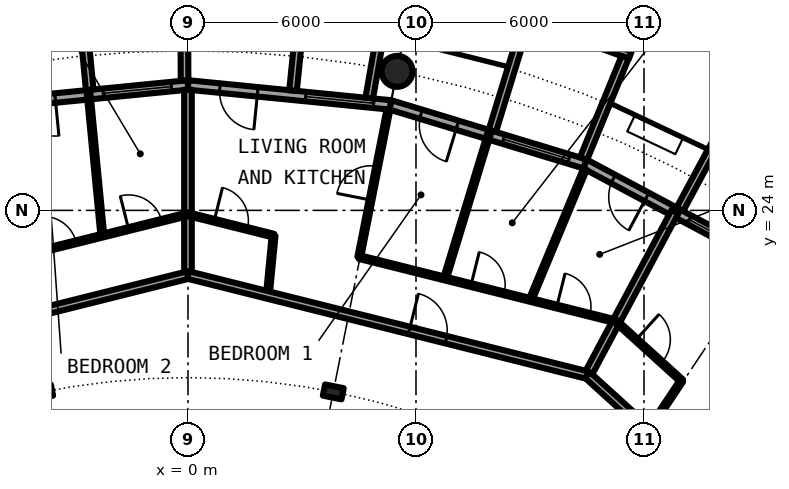
"""IFC4 building model, lengths in metres.
Left out: names, types, materials, properties, quantities, classifications, styles, units other than length and angle.
Written with IfcOpenShell. Run it as: python <this file> out.ifc"""

import sys

from ifc_helpers import new_model, si_unit, direction, frame, frame_2d, origin, origin_2d, place, context, subcontext, project, spatial, rectangle, circle, hollow_circle, i_section, extrude, element, fill, save


model = new_model("IFC4")
c1 = context("Model", 3, precision=1e-05, world=origin(), true_north=direction((0.0, 1.0)))
c2 = subcontext(c1, "Body", "Model", "MODEL_VIEW")
j1 = project(units=[si_unit("LENGTHUNIT", "METRE"), si_unit("PLANEANGLEUNIT", "RADIAN")], contexts=[c1])
p1 = place(None, origin())
s1 = spatial("IfcSite", under=j1, at=p1, CompositionType="ELEMENT")
p2 = place(p1, origin())
s2 = spatial("IfcBuilding", under=s1, at=p2, CompositionType="ELEMENT")
p3 = place(p2, frame((0.0, 0.0, 161.6)))
s3 = spatial("IfcBuildingStorey", under=s2, at=p3, CompositionType="ELEMENT", Elevation=161.6)
p4 = place(p3, frame((5.501, 27.658, 0.0), z_axis=(0.0, 0.0, 1.0), x_axis=(1.0, 0.0, 0.0)))
e1 = element("IfcColumn", 1, at=p4, inside=s3, PredefinedType="COLUMN", context=c2, shape_type="SweptSolid", body=[
    extrude(hollow_circle(Radius=0.406, WallThickness=0.04, at=origin_2d()), origin(), (0.0, 0.0, 1.0), 3.05),
])
for number, where, z_axis, x_axis in (
    (2, (3.824, 19.223, 0.0), (0.0, 0.0, 1.0), (0.195, 0.981, 0.0)),
    (3, (-3.824, 19.223, 0.0), (0.0, 0.0, 1.0), (-0.195, 0.981, 0.0)),
):
    element("IfcColumn", number, at=place(p3, frame(where, z_axis=z_axis, x_axis=x_axis)), inside=s3, PredefinedType="COLUMN", context=c2, shape_type="SweptSolid", body=[
        extrude(i_section(OverallWidth=0.3, OverallDepth=0.5, WebThickness=0.014, FlangeThickness=0.028, FilletRadius=0.027, at=origin_2d()), origin(), (0.0, 0.0, 1.0), 3.05),
    ])
p5 = place(p3, frame((15.167, 22.699, 0.0), z_axis=(0.0, 0.0, 1.0), x_axis=(-0.881915646801, 0.471407246368, 0.0)))
e4 = element("IfcWall", 4, at=p5, inside=s3, PredefinedType="SOLIDWALL", context=c2, shape_type="SweptSolid", body=[
    extrude(rectangle(XDim=5.352, YDim=0.25, at=frame_2d((2.676, 0.0))), origin(), (0.0, 0.0, 1.0), 2.7),
])
p6 = place(p5, frame((0.441, 0.0, 0.3)))
e5 = element("IfcOpeningElement", 5, at=p6, cuts=e4, PredefinedType="OPENING", context=c2, shape_type="SweptSolid", body=[
    extrude(rectangle(XDim=1.8, YDim=2.1, at=frame_2d((0.9, 1.05))), frame((0.0, 0.135, 0.0), z_axis=(0.0, -1.0, 0.0), x_axis=(1.0, 0.0, 0.0)), (0.0, 0.0, 1.0), 0.27),
])
p7 = place(p5, frame((3.51, 0.0, 0.0)))
e6 = element("IfcOpeningElement", 6, at=p7, cuts=e4, PredefinedType="OPENING", context=c2, shape_type="SweptSolid", body=[
    extrude(rectangle(XDim=1.0, YDim=2.2, at=frame_2d((0.5, 1.1))), frame((0.0, 0.135, 0.0), z_axis=(0.0, -1.0, 0.0), x_axis=(1.0, 0.0, 0.0)), (0.0, 0.0, 1.0), 0.27),
])
p8 = place(p3, frame((12.945, 24.029, -0.03), z_axis=(0.0, 0.0, 1.0), x_axis=(0.474424310775, 0.88029629861, 0.0)))
e7 = element("IfcWall", 7, at=p8, inside=s3, PredefinedType="SOLIDWALL", context=c2, shape_type="SweptSolid", body=[
    extrude(rectangle(XDim=3.006, YDim=0.2, at=frame_2d((1.503, 0.0))), origin(), (0.0, 0.0, 1.0), 2.73),
])
p9 = place(p3, frame((10.447, 25.222, 0.0), z_axis=(0.0, 0.0, 1.0), x_axis=(-0.956965678721, 0.290201119486, 0.0)))
e8 = element("IfcWall", 8, at=p9, inside=s3, PredefinedType="SOLIDWALL", context=c2, shape_type="SweptSolid", body=[
    extrude(rectangle(XDim=5.351, YDim=0.25, at=frame_2d((2.676, 0.0))), origin(), (0.0, 0.0, 1.0), 2.7),
])
p10 = place(p9, frame((0.441, 0.0, 0.3)))
e9 = element("IfcOpeningElement", 9, at=p10, cuts=e8, PredefinedType="OPENING", context=c2, shape_type="SweptSolid", body=[
    extrude(rectangle(XDim=1.8, YDim=2.1, at=frame_2d((0.9, 1.05))), frame((0.0, 0.135, 0.0), z_axis=(0.0, -1.0, 0.0), x_axis=(1.0, 0.0, 0.0)), (0.0, 0.0, 1.0), 0.27),
])
p11 = place(p9, frame((3.51, 0.0, 0.0)))
e10 = element("IfcOpeningElement", 10, at=p11, cuts=e8, PredefinedType="OPENING", context=c2, shape_type="SweptSolid", body=[
    extrude(rectangle(XDim=1.0, YDim=2.2, at=frame_2d((0.5, 1.1))), frame((0.0, 0.135, 0.0), z_axis=(0.0, -1.0, 0.0), x_axis=(1.0, 0.0, 0.0)), (0.0, 0.0, 1.0), 0.27),
])
p12 = place(p3, frame((11.638, 28.084, -0.03), z_axis=(0.0, 0.0, 1.0), x_axis=(-0.941461077774, 0.337121697664, 0.0)))
e11 = element("IfcWall", 11, at=p12, inside=s3, PredefinedType="SOLIDWALL", context=c2, shape_type="SweptSolid", body=[
    extrude(rectangle(XDim=2.993, YDim=0.2, at=frame_2d((1.497, 0.0))), origin(), (0.0, 0.0, 1.0), 2.73),
])
p13 = place(p12, frame((0.457, 0.0, 0.33)))
e12 = element("IfcOpeningElement", 12, at=p13, cuts=e11, PredefinedType="OPENING", context=c2, shape_type="SweptSolid", body=[
    extrude(circle(Radius=1.04, at=frame_2d((1.04, 1.04))), frame((0.0, 0.11, 0.0), z_axis=(0.0, -1.0, 0.0), x_axis=(1.0, 0.0, 0.0)), (0.0, 0.0, 1.0), 0.22),
])
p14 = place(p3, frame((10.409, 25.364, -0.03), z_axis=(0.0, 0.0, 1.0), x_axis=(0.379509886562, 0.925187681501, 0.0)))
e13 = element("IfcWall", 13, at=p14, inside=s3, PredefinedType="SOLIDWALL", context=c2, shape_type="SweptSolid", body=[
    extrude(rectangle(XDim=2.883, YDim=0.2, at=frame_2d((1.441, 0.0))), origin(), (0.0, 0.0, 1.0), 2.73),
])
p15 = place(p3, frame((8.009, 26.092, -0.03), z_axis=(0.0, 0.0, 1.0), x_axis=(0.293406695073, 0.955987715029, 0.0)))
e14 = element("IfcWall", 14, at=p15, inside=s3, PredefinedType="SOLIDWALL", context=c2, shape_type="SweptSolid", body=[
    extrude(rectangle(XDim=3.006, YDim=0.2, at=frame_2d((1.503, 0.0))), origin(), (0.0, 0.0, 1.0), 2.73),
])
p16 = place(p3, frame((5.326, 26.775, 0.0), z_axis=(0.0, 0.0, 1.0), x_axis=(-0.995173996315, 0.098126026407, 0.0)))
e15 = element("IfcWall", 15, at=p16, inside=s3, PredefinedType="SOLIDWALL", context=c2, shape_type="SweptSolid", body=[
    extrude(rectangle(XDim=5.352, YDim=0.25, at=frame_2d((2.676, 0.0))), origin(), (0.0, 0.0, 1.0), 2.7),
])
p17 = place(p16, frame((0.441, 0.0, 0.3)))
e16 = element("IfcOpeningElement", 16, at=p17, cuts=e15, PredefinedType="OPENING", context=c2, shape_type="SweptSolid", body=[
    extrude(rectangle(XDim=1.8, YDim=2.1, at=frame_2d((0.9, 1.05))), frame((0.0, 0.135, 0.0), z_axis=(0.0, -1.0, 0.0), x_axis=(1.0, 0.0, 0.0)), (0.0, 0.0, 1.0), 0.27),
])
p18 = place(p16, frame((3.51, 0.0, 0.0)))
e17 = element("IfcOpeningElement", 17, at=p18, cuts=e15, PredefinedType="OPENING", context=c2, shape_type="SweptSolid", body=[
    extrude(rectangle(XDim=1.0, YDim=2.2, at=frame_2d((0.5, 1.1))), frame((0.0, 0.135, 0.0), z_axis=(0.0, -1.0, 0.0), x_axis=(1.0, 0.0, 0.0)), (0.0, 0.0, 1.0), 0.27),
])
p19 = place(p3, frame((4.769, 26.956, -0.03), z_axis=(0.0, 0.0, 1.0), x_axis=(0.174056778901, 0.984735618183, 0.0)))
e18 = element("IfcWall", 18, at=p19, inside=s3, PredefinedType="SOLIDWALL", context=c2, shape_type="SweptSolid", body=[
    extrude(rectangle(XDim=2.925, YDim=0.2, at=frame_2d((1.462, 0.0))), origin(), (0.0, 0.0, 1.0), 2.73),
])
p20 = place(p3, frame((2.764, 27.153, -0.03), z_axis=(0.0, 0.0, 1.0), x_axis=(0.101505487237, 0.994834979311, 0.0)))
e19 = element("IfcWall", 19, at=p20, inside=s3, PredefinedType="SOLIDWALL", context=c2, shape_type="SweptSolid", body=[
    extrude(rectangle(XDim=3.007, YDim=0.2, at=frame_2d((1.503, 0.0))), origin(), (0.0, 0.0, 1.0), 2.73),
])
p21 = place(p3, frame((0.0, 27.3, 0.0), z_axis=(0.0, 0.0, 1.0), x_axis=(-0.995173996315, -0.098126026407, 0.0)))
e20 = element("IfcWall", 20, at=p21, inside=s3, PredefinedType="SOLIDWALL", context=c2, shape_type="SweptSolid", body=[
    extrude(rectangle(XDim=5.352, YDim=0.25, at=frame_2d((2.676, 0.0))), origin(), (0.0, 0.0, 1.0), 2.7),
])
p22 = place(p21, frame((0.441, 0.0, 0.3)))
e21 = element("IfcOpeningElement", 21, at=p22, cuts=e20, PredefinedType="OPENING", context=c2, shape_type="SweptSolid", body=[
    extrude(rectangle(XDim=1.8, YDim=2.1, at=frame_2d((0.9, 1.05))), frame((0.0, 0.135, 0.0), z_axis=(0.0, -1.0, 0.0), x_axis=(1.0, 0.0, 0.0)), (0.0, 0.0, 1.0), 0.27),
])
p23 = place(p21, frame((3.51, 0.0, 0.0)))
e22 = element("IfcOpeningElement", 22, at=p23, cuts=e20, PredefinedType="OPENING", context=c2, shape_type="SweptSolid", body=[
    extrude(rectangle(XDim=1.0, YDim=2.2, at=frame_2d((0.5, 1.1))), frame((0.0, 0.135, 0.0), z_axis=(0.0, -1.0, 0.0), x_axis=(1.0, 0.0, 0.0)), (0.0, 0.0, 1.0), 0.27),
])
p24 = place(p3, frame((-0.09, 27.417, -0.03), z_axis=(0.0, 0.0, 1.0), x_axis=(-0.00347308367, 0.999993968827, 0.0)))
e23 = element("IfcWall", 23, at=p24, inside=s3, PredefinedType="SOLIDWALL", context=c2, shape_type="SweptSolid", body=[
    extrude(rectangle(XDim=2.882, YDim=0.2, at=frame_2d((1.441, 0.0))), origin(), (0.0, 0.0, 1.0), 2.73),
])
p25 = place(p3, frame((-2.586, 27.171, -0.03), z_axis=(0.0, 0.0, 1.0), x_axis=(-0.094548432284, 0.995520262954, 0.0)))
e24 = element("IfcWall", 24, at=p25, inside=s3, PredefinedType="SOLIDWALL", context=c2, shape_type="SweptSolid", body=[
    extrude(rectangle(XDim=3.006, YDim=0.2, at=frame_2d((1.503, 0.0))), origin(), (0.0, 0.0, 1.0), 2.73),
])
p26 = place(p3, frame((-2.612, 27.049, 0.0), z_axis=(0.0, 0.0, 1.0), x_axis=(0.09626981452, -0.995355274669, 0.0)))
e25 = element("IfcWall", 25, at=p26, inside=s3, PredefinedType="PARTITIONING", context=c2, shape_type="SweptSolid", body=[
    extrude(rectangle(XDim=3.73, YDim=0.1, at=frame_2d((1.865, 0.0))), origin(), (0.0, 0.0, 1.0), 2.7),
])
p27 = place(p3, frame((0.0, 22.3, 0.0), z_axis=(0.0, 0.0, 1.0), x_axis=(0.0, 1.0, 0.0)))
e26 = element("IfcWall", 26, at=p27, inside=s3, PredefinedType="PARTITIONING", context=c2, shape_type="SweptSolid", body=[
    extrude(rectangle(XDim=4.875, YDim=0.2, at=frame_2d((2.438, 0.0))), origin(), (0.0, 0.0, 1.0), 2.7),
])
p28 = place(p3, frame((2.102, 21.773, 0.0), z_axis=(0.0, 0.0, 1.0), x_axis=(0.09608568494, 0.995373066317, 0.0)))
e27 = element("IfcWall", 27, at=p28, inside=s3, PredefinedType="PARTITIONING", context=c2, shape_type="SweptSolid", body=[
    extrude(rectangle(XDim=1.57, YDim=0.1, at=frame_2d((0.785, 0.0))), origin(), (0.0, 0.0, 1.0), 2.7),
])
p29 = place(p3, frame((4.507, 22.771, 0.0), z_axis=(0.0, 0.0, 1.0), x_axis=(0.194030211642, 0.980995554001, 0.0)))
e28 = element("IfcWall", 28, at=p29, inside=s3, PredefinedType="PARTITIONING", context=c2, shape_type="SweptSolid", body=[
    extrude(rectangle(XDim=3.962, YDim=0.1, at=frame_2d((1.981, 0.0))), origin(), (0.0, 0.0, 1.0), 2.7),
])
p30 = place(p29, frame((1.531, 0.0, 0.0)))
e29 = element("IfcOpeningElement", 29, at=p30, cuts=e28, PredefinedType="OPENING", context=c2, shape_type="SweptSolid", body=[
    extrude(rectangle(XDim=0.9, YDim=2.3, at=frame_2d((0.45, 1.15))), frame((0.0, 0.06, 0.0), z_axis=(0.0, -1.0, 0.0), x_axis=(1.0, 0.0, 0.0)), (0.0, 0.0, 1.0), 0.12),
])
p31 = place(p3, frame((6.763, 22.206, 0.0), z_axis=(0.0, 0.0, 1.0), x_axis=(0.291291575636, 0.956634317785, 0.0)))
e30 = element("IfcWall", 30, at=p31, inside=s3, PredefinedType="PARTITIONING", context=c2, shape_type="SweptSolid", body=[
    extrude(rectangle(XDim=3.962, YDim=0.1, at=frame_2d((1.981, 0.0))), origin(), (0.0, 0.0, 1.0), 2.7),
])
p32 = place(p3, frame((9.013, 21.642, 0.0), z_axis=(0.0, 0.0, 1.0), x_axis=(0.384420204655, 0.923158223845, 0.0)))
e31 = element("IfcWall", 31, at=p32, inside=s3, PredefinedType="PARTITIONING", context=c2, shape_type="SweptSolid", body=[
    extrude(rectangle(XDim=3.73, YDim=0.1, at=frame_2d((1.865, 0.0))), origin(), (0.0, 0.0, 1.0), 2.7),
])
p33 = place(p3, frame((10.516, 19.665, 0.0), z_axis=(0.0, 0.0, 1.0), x_axis=(0.471388689095, 0.881925565903, 0.0)))
e32 = element("IfcWall", 32, at=p33, inside=s3, PredefinedType="PARTITIONING", context=c2, shape_type="SweptSolid", body=[
    extrude(rectangle(XDim=4.875, YDim=0.2, at=frame_2d((2.438, 0.0))), origin(), (0.0, 0.0, 1.0), 2.7),
])
p34 = place(p3, frame((12.118, 18.211, 0.0), z_axis=(0.0, 0.0, 1.0), x_axis=(0.554125989098, 0.832432813028, 0.0)))
e33 = element("IfcWall", 33, at=p34, inside=s3, PredefinedType="PARTITIONING", context=c2, shape_type="SweptSolid", body=[
    extrude(rectangle(XDim=1.57, YDim=0.1, at=frame_2d((0.785, 0.0))), origin(), (0.0, 0.0, 1.0), 2.7),
])
p35 = place(p3, frame((-10.512, 19.667, 0.0), z_axis=(0.0, 0.0, 1.0), x_axis=(0.970086843848, 0.242758141765, 0.0)))
e34 = element("IfcWall", 34, at=p35, inside=s3, PredefinedType="PARTITIONING", context=c2, shape_type="SweptSolid", body=[
    extrude(rectangle(XDim=10.842, YDim=0.2, at=frame_2d((5.421, 0.0))), origin(), (0.0, 0.0, 1.0), 2.7),
])
p36 = place(p35, frame((6.002, 0.0, 0.0)))
e35 = element("IfcOpeningElement", 35, at=p36, cuts=e34, PredefinedType="OPENING", context=c2, shape_type="SweptSolid", body=[
    extrude(rectangle(XDim=1.0, YDim=2.3, at=frame_2d((0.5, 1.15))), frame((0.0, 0.11, 0.0), z_axis=(0.0, -1.0, 0.0), x_axis=(1.0, 0.0, 0.0)), (0.0, 0.0, 1.0), 0.22),
])
p37 = place(p3, frame((0.0, 22.3, 0.0), z_axis=(0.0, 0.0, 1.0), x_axis=(0.969975381822, -0.243203122222, 0.0)))
e36 = element("IfcWall", 36, at=p37, inside=s3, PredefinedType="PARTITIONING", context=c2, shape_type="SweptSolid", body=[
    extrude(rectangle(XDim=10.843, YDim=0.2, at=frame_2d((5.421, 0.0))), origin(), (0.0, 0.0, 1.0), 2.7),
])
p38 = place(p37, frame((6.002, 0.0, 0.0)))
e37 = element("IfcOpeningElement", 37, at=p38, cuts=e36, PredefinedType="OPENING", context=c2, shape_type="SweptSolid", body=[
    extrude(rectangle(XDim=1.0, YDim=2.3, at=frame_2d((0.5, 1.15))), frame((0.0, 0.11, 0.0), z_axis=(0.0, -1.0, 0.0), x_axis=(1.0, 0.0, 0.0)), (0.0, 0.0, 1.0), 0.22),
])
p39 = place(p3, frame((10.512, 19.667, 0.0), z_axis=(0.0, 0.0, 1.0), x_axis=(0.740849323054, -0.67167125927, 0.0)))
e38 = element("IfcWall", 38, at=p39, inside=s3, PredefinedType="PARTITIONING", context=c2, shape_type="SweptSolid", body=[
    extrude(rectangle(XDim=10.842, YDim=0.2, at=frame_2d((5.421, 0.0))), origin(), (0.0, 0.0, 1.0), 2.7),
])
p40 = place(p39, frame((6.003, 0.0, 0.0)))
e39 = element("IfcOpeningElement", 39, at=p40, cuts=e38, PredefinedType="OPENING", context=c2, shape_type="SweptSolid", body=[
    extrude(rectangle(XDim=1.0, YDim=2.3, at=frame_2d((0.5, 1.15))), frame((0.0, 0.11, 0.0), z_axis=(0.0, -1.0, 0.0), x_axis=(1.0, 0.0, 0.0)), (0.0, 0.0, 1.0), 0.22),
])
p41 = place(p3, frame((-6.76, 22.206, 0.0), z_axis=(0.0, 0.0, 1.0), x_axis=(0.970070358667, 0.242824008772, 0.0)))
e40 = element("IfcWall", 40, at=p41, inside=s3, PredefinedType="PARTITIONING", context=c2, shape_type="SweptSolid", body=[
    extrude(rectangle(XDim=6.972, YDim=0.1, at=frame_2d((3.486, 0.0))), origin(), (0.0, 0.0, 1.0), 2.7),
])
p42 = place(p41, frame((3.037, 0.0, 0.0)))
e41 = element("IfcOpeningElement", 41, at=p42, cuts=e40, PredefinedType="OPENING", context=c2, shape_type="SweptSolid", body=[
    extrude(rectangle(XDim=0.9, YDim=2.3, at=frame_2d((0.45, 1.15))), frame((0.0, 0.06, 0.0), z_axis=(0.0, -1.0, 0.0), x_axis=(1.0, 0.0, 0.0)), (0.0, 0.0, 1.0), 0.12),
])
p43 = place(p41, frame((5.357, 0.0, 0.0)))
e42 = element("IfcOpeningElement", 42, at=p43, cuts=e40, PredefinedType="OPENING", context=c2, shape_type="SweptSolid", body=[
    extrude(rectangle(XDim=0.9, YDim=2.3, at=frame_2d((0.45, 1.15))), frame((0.0, 0.06, 0.0), z_axis=(0.0, -1.0, 0.0), x_axis=(1.0, 0.0, 0.0)), (0.0, 0.0, 1.0), 0.12),
])
p44 = place(p3, frame((0.003, 23.899, 0.0), z_axis=(0.0, 0.0, 1.0), x_axis=(0.970074448647, -0.242807668911, 0.0)))
e43 = element("IfcWall", 43, at=p44, inside=s3, PredefinedType="PARTITIONING", context=c2, shape_type="SweptSolid", body=[
    extrude(rectangle(XDim=2.323, YDim=0.1, at=frame_2d((1.161, 0.0))), origin(), (0.0, 0.0, 1.0), 2.7),
])
p45 = place(p44, frame((0.708, 0.0, 0.0)))
e44 = element("IfcOpeningElement", 44, at=p45, cuts=e43, PredefinedType="OPENING", context=c2, shape_type="SweptSolid", body=[
    extrude(rectangle(XDim=0.9, YDim=2.3, at=frame_2d((0.45, 1.15))), frame((0.0, 0.06, 0.0), z_axis=(0.0, -1.0, 0.0), x_axis=(1.0, 0.0, 0.0)), (0.0, 0.0, 1.0), 0.12),
])
p46 = place(p3, frame((4.507, 22.771, 0.0), z_axis=(0.0, 0.0, 1.0), x_axis=(0.970020829306, -0.243021790611, 0.0)))
e45 = element("IfcWall", 45, at=p46, inside=s3, PredefinedType="PARTITIONING", context=c2, shape_type="SweptSolid", body=[
    extrude(rectangle(XDim=6.971, YDim=0.1, at=frame_2d((3.485, 0.0))), origin(), (0.0, 0.0, 1.0), 2.7),
])
p47 = place(p46, frame((3.031, 0.0, 0.0)))
e46 = element("IfcOpeningElement", 46, at=p47, cuts=e45, PredefinedType="OPENING", context=c2, shape_type="SweptSolid", body=[
    extrude(rectangle(XDim=0.9, YDim=2.3, at=frame_2d((0.45, 1.15))), frame((0.0, 0.06, 0.0), z_axis=(0.0, -1.0, 0.0), x_axis=(1.0, 0.0, 0.0)), (0.0, 0.0, 1.0), 0.12),
])
p48 = place(p46, frame((5.358, 0.0, 0.0)))
e47 = element("IfcOpeningElement", 47, at=p48, cuts=e45, PredefinedType="OPENING", context=c2, shape_type="SweptSolid", body=[
    extrude(rectangle(XDim=0.9, YDim=2.3, at=frame_2d((0.45, 1.15))), frame((0.0, 0.06, 0.0), z_axis=(0.0, -1.0, 0.0), x_axis=(1.0, 0.0, 0.0)), (0.0, 0.0, 1.0), 0.12),
])
p49 = place(p3, frame((11.271, 21.074, 0.0), z_axis=(0.0, 0.0, 1.0), x_axis=(0.74087097024, -0.671647381783, 0.0)))
e48 = element("IfcWall", 48, at=p49, inside=s3, PredefinedType="PARTITIONING", context=c2, shape_type="SweptSolid", body=[
    extrude(rectangle(XDim=2.324, YDim=0.1, at=frame_2d((1.162, 0.0))), origin(), (0.0, 0.0, 1.0), 2.7),
])
p50 = place(p49, frame((0.705, 0.0, 0.0)))
e49 = element("IfcOpeningElement", 49, at=p50, cuts=e48, PredefinedType="OPENING", context=c2, shape_type="SweptSolid", body=[
    extrude(rectangle(XDim=0.9, YDim=2.3, at=frame_2d((0.45, 1.15))), frame((0.0, 0.06, 0.0), z_axis=(0.0, -1.0, 0.0), x_axis=(1.0, 0.0, 0.0)), (0.0, 0.0, 1.0), 0.12),
])
p51 = place(p6, origin())
e50 = element("IfcWindow", 50, at=p51, inside=s3, PartitioningType="SINGLE_PANEL", PredefinedType="WINDOW", context=c2, shape_type="SweptSolid", body=[
    extrude(rectangle(XDim=1.8, YDim=2.1, at=frame_2d((0.9, 1.05))), frame((0.0, 0.03, 0.0), z_axis=(0.0, -1.0, 0.0), x_axis=(1.0, 0.0, 0.0)), (0.0, 0.0, 1.0), 0.06),
])
fill(e5, e50)
p52 = place(p7, origin())
e51 = element("IfcDoor", 51, at=p52, inside=s3, OperationType="SINGLE_SWING_LEFT", PredefinedType="DOOR", context=c2, shape_type="SweptSolid", body=[
    extrude(rectangle(XDim=1.0, YDim=2.2, at=frame_2d((0.5, 1.1))), frame((0.0, 0.025, 0.0), z_axis=(0.0, -1.0, 0.0), x_axis=(1.0, 0.0, 0.0)), (0.0, 0.0, 1.0), 0.05),
])
fill(e6, e51)
p53 = place(p10, origin())
e52 = element("IfcWindow", 52, at=p53, inside=s3, PartitioningType="SINGLE_PANEL", PredefinedType="WINDOW", context=c2, shape_type="SweptSolid", body=[
    extrude(rectangle(XDim=1.8, YDim=2.1, at=frame_2d((0.9, 1.05))), frame((0.0, 0.03, 0.0), z_axis=(0.0, -1.0, 0.0), x_axis=(1.0, 0.0, 0.0)), (0.0, 0.0, 1.0), 0.06),
])
fill(e9, e52)
p54 = place(p11, origin())
e53 = element("IfcDoor", 53, at=p54, inside=s3, OperationType="SINGLE_SWING_LEFT", PredefinedType="DOOR", context=c2, shape_type="SweptSolid", body=[
    extrude(rectangle(XDim=1.0, YDim=2.2, at=frame_2d((0.5, 1.1))), frame((0.0, 0.025, 0.0), z_axis=(0.0, -1.0, 0.0), x_axis=(1.0, 0.0, 0.0)), (0.0, 0.0, 1.0), 0.05),
])
fill(e10, e53)
p55 = place(p17, origin())
e54 = element("IfcWindow", 54, at=p55, inside=s3, PartitioningType="SINGLE_PANEL", PredefinedType="WINDOW", context=c2, shape_type="SweptSolid", body=[
    extrude(rectangle(XDim=1.8, YDim=2.1, at=frame_2d((0.9, 1.05))), frame((0.0, 0.03, 0.0), z_axis=(0.0, -1.0, 0.0), x_axis=(1.0, 0.0, 0.0)), (0.0, 0.0, 1.0), 0.06),
])
fill(e16, e54)
p56 = place(p18, origin())
e55 = element("IfcDoor", 55, at=p56, inside=s3, OperationType="SINGLE_SWING_LEFT", PredefinedType="DOOR", context=c2, shape_type="SweptSolid", body=[
    extrude(rectangle(XDim=1.0, YDim=2.2, at=frame_2d((0.5, 1.1))), frame((0.0, 0.025, 0.0), z_axis=(0.0, -1.0, 0.0), x_axis=(1.0, 0.0, 0.0)), (0.0, 0.0, 1.0), 0.05),
])
fill(e17, e55)
p57 = place(p22, origin())
e56 = element("IfcWindow", 56, at=p57, inside=s3, PartitioningType="SINGLE_PANEL", PredefinedType="WINDOW", context=c2, shape_type="SweptSolid", body=[
    extrude(rectangle(XDim=1.8, YDim=2.1, at=frame_2d((0.9, 1.05))), frame((0.0, 0.03, 0.0), z_axis=(0.0, -1.0, 0.0), x_axis=(1.0, 0.0, 0.0)), (0.0, 0.0, 1.0), 0.06),
])
fill(e21, e56)
p58 = place(p23, origin())
e57 = element("IfcDoor", 57, at=p58, inside=s3, OperationType="SINGLE_SWING_LEFT", PredefinedType="DOOR", context=c2, shape_type="SweptSolid", body=[
    extrude(rectangle(XDim=1.0, YDim=2.2, at=frame_2d((0.5, 1.1))), frame((0.0, 0.025, 0.0), z_axis=(0.0, -1.0, 0.0), x_axis=(1.0, 0.0, 0.0)), (0.0, 0.0, 1.0), 0.05),
])
fill(e22, e57)
p59 = place(p50, origin())
e58 = element("IfcDoor", 58, at=p59, inside=s3, OperationType="SINGLE_SWING_LEFT", PredefinedType="DOOR", context=c2, shape_type="SweptSolid", body=[
    extrude(rectangle(XDim=0.9, YDim=2.3, at=frame_2d((0.45, 1.15))), frame((0.0, 0.025, 0.0), z_axis=(0.0, -1.0, 0.0), x_axis=(1.0, 0.0, 0.0)), (0.0, 0.0, 1.0), 0.05),
])
fill(e49, e58)
p60 = place(p38, origin())
e59 = element("IfcDoor", 59, at=p60, inside=s3, OperationType="SINGLE_SWING_RIGHT", PredefinedType="DOOR", context=c2, shape_type="SweptSolid", body=[
    extrude(rectangle(XDim=1.0, YDim=2.3, at=frame_2d((0.5, 1.15))), frame((0.0, 0.025, 0.0), z_axis=(0.0, -1.0, 0.0), x_axis=(1.0, 0.0, 0.0)), (0.0, 0.0, 1.0), 0.05),
])
fill(e37, e59)
p61 = place(p45, origin())
e60 = element("IfcDoor", 60, at=p61, inside=s3, OperationType="SINGLE_SWING_LEFT", PredefinedType="DOOR", context=c2, shape_type="SweptSolid", body=[
    extrude(rectangle(XDim=0.9, YDim=2.3, at=frame_2d((0.45, 1.15))), frame((0.0, 0.025, 0.0), z_axis=(0.0, -1.0, 0.0), x_axis=(1.0, 0.0, 0.0)), (0.0, 0.0, 1.0), 0.05),
])
fill(e44, e60)
p62 = place(p30, origin())
e61 = element("IfcDoor", 61, at=p62, inside=s3, OperationType="SINGLE_SWING_RIGHT", PredefinedType="DOOR", context=c2, shape_type="SweptSolid", body=[
    extrude(rectangle(XDim=0.9, YDim=2.3, at=frame_2d((0.45, 1.15))), frame((0.0, 0.025, 0.0), z_axis=(0.0, -1.0, 0.0), x_axis=(1.0, 0.0, 0.0)), (0.0, 0.0, 1.0), 0.05),
])
fill(e29, e61)
p63 = place(p47, origin())
e62 = element("IfcDoor", 62, at=p63, inside=s3, OperationType="SINGLE_SWING_LEFT", PredefinedType="DOOR", context=c2, shape_type="SweptSolid", body=[
    extrude(rectangle(XDim=0.9, YDim=2.3, at=frame_2d((0.45, 1.15))), frame((0.0, 0.025, 0.0), z_axis=(0.0, -1.0, 0.0), x_axis=(1.0, 0.0, 0.0)), (0.0, 0.0, 1.0), 0.05),
])
fill(e46, e62)
p64 = place(p48, origin())
e63 = element("IfcDoor", 63, at=p64, inside=s3, OperationType="SINGLE_SWING_RIGHT", PredefinedType="DOOR", context=c2, shape_type="SweptSolid", body=[
    extrude(rectangle(XDim=0.9, YDim=2.3, at=frame_2d((0.45, 1.15))), frame((0.0, 0.025, 0.0), z_axis=(0.0, -1.0, 0.0), x_axis=(1.0, 0.0, 0.0)), (0.0, 0.0, 1.0), 0.05),
])
fill(e47, e63)
p65 = place(p42, origin())
e64 = element("IfcDoor", 64, at=p65, inside=s3, OperationType="SINGLE_SWING_RIGHT", PredefinedType="DOOR", context=c2, shape_type="SweptSolid", body=[
    extrude(rectangle(XDim=0.9, YDim=2.3, at=frame_2d((0.45, 1.15))), frame((0.0, 0.025, 0.0), z_axis=(0.0, -1.0, 0.0), x_axis=(1.0, 0.0, 0.0)), (0.0, 0.0, 1.0), 0.05),
])
fill(e41, e64)
p66 = place(p43, origin())
e65 = element("IfcDoor", 65, at=p66, inside=s3, OperationType="SINGLE_SWING_RIGHT", PredefinedType="DOOR", context=c2, shape_type="SweptSolid", body=[
    extrude(rectangle(XDim=0.9, YDim=2.3, at=frame_2d((0.45, 1.15))), frame((0.0, 0.025, 0.0), z_axis=(0.0, -1.0, 0.0), x_axis=(1.0, 0.0, 0.0)), (0.0, 0.0, 1.0), 0.05),
])
fill(e42, e65)
save(model, sys.argv[1])
